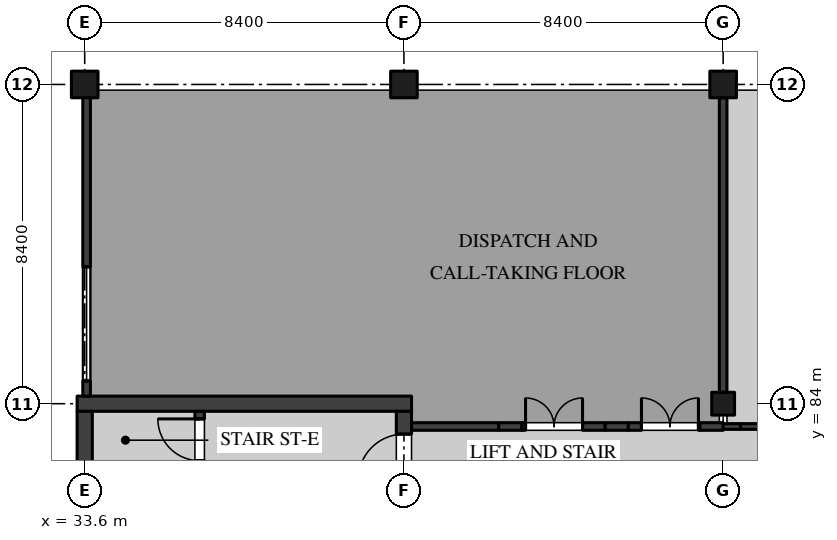
"""IFC4 building model, lengths in metres.
Left out: names, types, materials, properties, quantities, classifications, styles, units other than length and angle.
Written with IfcOpenShell. Run it as: python <this file> out.ifc"""

import sys

from ifc_helpers import new_model, si_unit, direction, frame, frame_2d, origin, origin_2d, place, context, subcontext, project, spatial, rectangle, extrude, element, fill, save


model = new_model("IFC4")
c1 = context("Model", 3, precision=1e-05, world=origin(), true_north=direction((0.0, 1.0)))
c2 = subcontext(c1, "Body", "Model", "MODEL_VIEW")
j1 = project(units=[si_unit("LENGTHUNIT", "METRE"), si_unit("PLANEANGLEUNIT", "RADIAN")], contexts=[c1])
p1 = place(None, origin())
s1 = spatial("IfcSite", under=j1, at=p1, CompositionType="ELEMENT")
p2 = place(p1, origin())
s2 = spatial("IfcBuilding", under=s1, at=p2, CompositionType="ELEMENT")
p3 = place(p2, frame((0.0, 0.0, 5.4)))
s3 = spatial("IfcBuildingStorey", under=s2, at=p3, CompositionType="ELEMENT", Elevation=5.4)
for number, where, z_axis, x_axis in (
    (1, (33.6, 92.4, 0.0), (0.0, 0.0, 1.0), (1.0, 0.0, 0.0)),
    (2, (42.0, 92.4, 0.0), (0.0, 0.0, 1.0), (1.0, 0.0, 0.0)),
):
    element("IfcColumn", number, at=place(p3, frame(where, z_axis=z_axis, x_axis=x_axis)), inside=s3, PredefinedType="COLUMN", context=c2, shape_type="SweptSolid", body=[
        extrude(rectangle(XDim=0.7, YDim=0.7, at=origin_2d()), origin(), (0.0, 0.0, 1.0), 4.37),
    ])
p4 = place(p3, frame((50.4, 84.0, 0.0), z_axis=(0.0, 0.0, 1.0), x_axis=(1.0, 0.0, 0.0)))
e3 = element("IfcColumn", 3, at=p4, inside=s3, PredefinedType="COLUMN", context=c2, shape_type="SweptSolid", body=[
    extrude(rectangle(XDim=0.6, YDim=0.6, at=origin_2d()), origin(), (0.0, 0.0, 1.0), 4.37),
])
p5 = place(p3, frame((50.4, 92.4, 0.0), z_axis=(0.0, 0.0, 1.0), x_axis=(1.0, 0.0, 0.0)))
e4 = element("IfcColumn", 4, at=p5, inside=s3, PredefinedType="COLUMN", context=c2, shape_type="SweptSolid", body=[
    extrude(rectangle(XDim=0.7, YDim=0.7, at=origin_2d()), origin(), (0.0, 0.0, 1.0), 4.37),
])
p6 = place(p3, frame((33.4, 84.0, 0.0), z_axis=(0.0, 0.0, 1.0), x_axis=(1.0, 0.0, 0.0)))
e5 = element("IfcWall", 5, at=p6, inside=s3, PredefinedType="SHEAR", context=c2, shape_type="SweptSolid", body=[
    extrude(rectangle(XDim=8.8, YDim=0.4, at=frame_2d((4.4, 0.0))), origin(), (0.0, 0.0, 1.0), 4.37),
])
p7 = place(p3, frame((33.6, 75.8, 0.0), z_axis=(0.0, 0.0, 1.0), x_axis=(0.0, 1.0, 0.0)))
e6 = element("IfcWall", 6, at=p7, inside=s3, PredefinedType="SHEAR", context=c2, shape_type="SweptSolid", body=[
    extrude(rectangle(XDim=8.0, YDim=0.4, at=frame_2d((4.0, 0.0))), origin(), (0.0, 0.0, 1.0), 4.37),
])
p8 = place(p3, frame((42.0, 75.8, 0.0), z_axis=(0.0, 0.0, 1.0), x_axis=(0.0, 1.0, 0.0)))
e7 = element("IfcWall", 7, at=p8, inside=s3, PredefinedType="SHEAR", context=c2, shape_type="SweptSolid", body=[
    extrude(rectangle(XDim=8.0, YDim=0.4, at=frame_2d((4.0, 0.0))), origin(), (0.0, 0.0, 1.0), 4.37),
])
p9 = place(p8, frame((6.2, 0.0, 0.0)))
e8 = element("IfcOpeningElement", 8, at=p9, cuts=e7, PredefinedType="OPENING", context=c2, shape_type="SweptSolid", body=[
    extrude(rectangle(XDim=1.2, YDim=2.1, at=frame_2d((0.6, 1.05))), frame((0.0, 0.21, 0.0), z_axis=(0.0, -1.0, 0.0), x_axis=(1.0, 0.0, 0.0)), (0.0, 0.0, 1.0), 0.42),
])
p10 = place(p3, frame((36.625, 83.8, 0.0), z_axis=(0.0, 0.0, 1.0), x_axis=(0.0, -1.0, 0.0)))
e9 = element("IfcWall", 9, at=p10, inside=s3, PredefinedType="SOLIDWALL", context=c2, shape_type="SweptSolid", body=[
    extrude(rectangle(XDim=8.0, YDim=0.25, at=frame_2d((4.0, 0.0))), origin(), (0.0, 0.0, 1.0), 4.37),
])
p11 = place(p10, frame((0.2, 0.0, 0.0)))
e10 = element("IfcOpeningElement", 10, at=p11, cuts=e9, PredefinedType="OPENING", context=c2, shape_type="SweptSolid", body=[
    extrude(rectangle(XDim=1.1, YDim=2.1, at=frame_2d((0.55, 1.05))), frame((0.0, 0.135, 0.0), z_axis=(0.0, -1.0, 0.0), x_axis=(1.0, 0.0, 0.0)), (0.0, 0.0, 1.0), 0.27),
])
p12 = place(p3, frame((42.2, 83.4, 0.0), z_axis=(0.0, 0.0, 1.0), x_axis=(1.0, 0.0, 0.0)))
e11 = element("IfcWall", 11, at=p12, inside=s3, PredefinedType="PARTITIONING", context=c2, shape_type="SweptSolid", body=[
    extrude(rectangle(XDim=2.295, YDim=0.2, at=frame_2d((1.147, 0.0))), origin(), (0.0, 0.0, 1.0), 4.37),
])
p13 = place(p3, frame((44.495, 83.4, 0.0), z_axis=(0.0, 0.0, 1.0), x_axis=(1.0, 0.0, 0.0)))
e12 = element("IfcWall", 12, at=p13, inside=s3, PredefinedType="PARTITIONING", context=c2, shape_type="SweptSolid", body=[
    extrude(rectangle(XDim=0.61, YDim=0.2, at=frame_2d((0.305, 0.0))), origin(), (0.0, 0.0, 1.0), 3.895),
])
p14 = place(p3, frame((45.105, 83.4, 0.0), z_axis=(0.0, 0.0, 1.0), x_axis=(1.0, 0.0, 0.0)))
e13 = element("IfcWall", 13, at=p14, inside=s3, PredefinedType="PARTITIONING", context=c2, shape_type="SweptSolid", body=[
    extrude(rectangle(XDim=2.19, YDim=0.2, at=frame_2d((1.095, 0.0))), origin(), (0.0, 0.0, 1.0), 4.37),
])
p15 = place(p14, frame((0.095, 0.0, 0.0)))
e14 = element("IfcOpeningElement", 14, at=p15, cuts=e13, PredefinedType="OPENING", context=c2, shape_type="SweptSolid", body=[
    extrude(rectangle(XDim=1.5, YDim=2.1, at=frame_2d((0.75, 1.05))), frame((0.0, 0.11, 0.0), z_axis=(0.0, -1.0, 0.0), x_axis=(1.0, 0.0, 0.0)), (0.0, 0.0, 1.0), 0.22),
])
p16 = place(p3, frame((47.295, 83.4, 0.0), z_axis=(0.0, 0.0, 1.0), x_axis=(1.0, 0.0, 0.0)))
e15 = element("IfcWall", 15, at=p16, inside=s3, PredefinedType="PARTITIONING", context=c2, shape_type="SweptSolid", body=[
    extrude(rectangle(XDim=0.61, YDim=0.2, at=frame_2d((0.305, 0.0))), origin(), (0.0, 0.0, 1.0), 3.895),
])
p17 = place(p3, frame((47.905, 83.4, 0.0), z_axis=(0.0, 0.0, 1.0), x_axis=(1.0, 0.0, 0.0)))
e16 = element("IfcWall", 16, at=p17, inside=s3, PredefinedType="PARTITIONING", context=c2, shape_type="SweptSolid", body=[
    extrude(rectangle(XDim=1.885, YDim=0.2, at=frame_2d((0.942, 0.0))), origin(), (0.0, 0.0, 1.0), 4.37),
])
p18 = place(p17, frame((0.345, 0.0, 0.0)))
e17 = element("IfcOpeningElement", 17, at=p18, cuts=e16, PredefinedType="OPENING", context=c2, shape_type="SweptSolid", body=[
    extrude(rectangle(XDim=1.5, YDim=2.1, at=frame_2d((0.75, 1.05))), frame((0.0, 0.11, 0.0), z_axis=(0.0, -1.0, 0.0), x_axis=(1.0, 0.0, 0.0)), (0.0, 0.0, 1.0), 0.22),
])
p19 = place(p3, frame((49.79, 83.4, 0.0), z_axis=(0.0, 0.0, 1.0), x_axis=(1.0, 0.0, 0.0)))
e18 = element("IfcWall", 18, at=p19, inside=s3, PredefinedType="PARTITIONING", context=c2, shape_type="SweptSolid", body=[
    extrude(rectangle(XDim=0.61, YDim=0.2, at=frame_2d((0.305, 0.0))), origin(), (0.0, 0.0, 1.0), 3.746),
])
p20 = place(p3, frame((50.4, 83.4, 0.0), z_axis=(0.0, 0.0, 1.0), x_axis=(1.0, 0.0, 0.0)))
e19 = element("IfcWall", 19, at=p20, inside=s3, PredefinedType="PARTITIONING", context=c2, shape_type="SweptSolid", body=[
    extrude(rectangle(XDim=0.46, YDim=0.15, at=frame_2d((0.23, 0.0))), origin(), (0.0, 0.0, 1.0), 3.746),
])
p21 = place(p3, frame((50.86, 83.4, 0.0), z_axis=(0.0, 0.0, 1.0), x_axis=(1.0, 0.0, 0.0)))
e20 = element("IfcWall", 20, at=p21, inside=s3, PredefinedType="PARTITIONING", context=c2, shape_type="SweptSolid", body=[
    extrude(rectangle(XDim=2.11, YDim=0.15, at=frame_2d((1.055, 0.0))), origin(), (0.0, 0.0, 1.0), 4.37),
])
p22 = place(p3, frame((50.4, 84.3, 0.0), z_axis=(0.0, 0.0, 1.0), x_axis=(0.0, 1.0, 0.0)))
e21 = element("IfcWall", 21, at=p22, inside=s3, PredefinedType="PARTITIONING", context=c2, shape_type="SweptSolid", body=[
    extrude(rectangle(XDim=7.75, YDim=0.2, at=frame_2d((3.875, 0.0))), origin(), (0.0, 0.0, 1.0), 3.746),
])
p23 = place(p3, frame((33.65, 92.07, 0.0), z_axis=(0.0, 0.0, 1.0), x_axis=(0.0, -1.0, 0.0)))
e22 = element("IfcWall", 22, at=p23, inside=s3, PredefinedType="SOLIDWALL", context=c2, shape_type="SweptSolid", body=[
    extrude(rectangle(XDim=7.87, YDim=0.2, at=frame_2d((3.935, 0.0))), origin(), (0.0, 0.0, 1.0), 3.746),
])
p24 = place(p23, frame((4.47, 0.0, 0.9)))
e23 = element("IfcOpeningElement", 23, at=p24, cuts=e22, PredefinedType="OPENING", context=c2, shape_type="SweptSolid", body=[
    extrude(rectangle(XDim=3.0, YDim=2.1, at=frame_2d((1.5, 1.05))), frame((0.0, 0.11, 0.0), z_axis=(0.0, -1.0, 0.0), x_axis=(1.0, 0.0, 0.0)), (0.0, 0.0, 1.0), 0.22),
])
p25 = place(p9, origin())
e24 = element("IfcDoor", 24, at=p25, inside=s3, OperationType="SINGLE_SWING_RIGHT", PredefinedType="DOOR", context=c2, shape_type="SweptSolid", body=[
    extrude(rectangle(XDim=1.2, YDim=2.1, at=frame_2d((0.6, 1.05))), frame((0.0, 0.035, 0.0), z_axis=(0.0, -1.0, 0.0), x_axis=(1.0, 0.0, 0.0)), (0.0, 0.0, 1.0), 0.07),
])
fill(e8, e24)
p26 = place(p11, frame((1.1, 0.0, 0.0), z_axis=(0.0, 0.0, 1.0), x_axis=(-1.0, 0.0, 0.0)))
e25 = element("IfcDoor", 25, at=p26, inside=s3, OperationType="SINGLE_SWING_LEFT", PredefinedType="DOOR", context=c2, shape_type="SweptSolid", body=[
    extrude(rectangle(XDim=1.1, YDim=2.1, at=frame_2d((0.55, 1.05))), frame((0.0, 0.035, 0.0), z_axis=(0.0, -1.0, 0.0), x_axis=(1.0, 0.0, 0.0)), (0.0, 0.0, 1.0), 0.07),
])
fill(e10, e25)
p27 = place(p15, origin())
e26 = element("IfcDoor", 26, at=p27, inside=s3, OperationType="DOUBLE_DOOR_SINGLE_SWING", PredefinedType="DOOR", context=c2, shape_type="SweptSolid", body=[
    extrude(rectangle(XDim=1.5, YDim=2.1, at=frame_2d((0.75, 1.05))), frame((0.0, 0.03, 0.0), z_axis=(0.0, -1.0, 0.0), x_axis=(1.0, 0.0, 0.0)), (0.0, 0.0, 1.0), 0.06),
])
fill(e14, e26)
p28 = place(p18, origin())
e27 = element("IfcDoor", 27, at=p28, inside=s3, OperationType="DOUBLE_DOOR_SINGLE_SWING", PredefinedType="DOOR", context=c2, shape_type="SweptSolid", body=[
    extrude(rectangle(XDim=1.5, YDim=2.1, at=frame_2d((0.75, 1.05))), frame((0.0, 0.03, 0.0), z_axis=(0.0, -1.0, 0.0), x_axis=(1.0, 0.0, 0.0)), (0.0, 0.0, 1.0), 0.06),
])
fill(e17, e27)
p29 = place(p24, origin())
e28 = element("IfcWindow", 28, at=p29, inside=s3, PartitioningType="SINGLE_PANEL", PredefinedType="WINDOW", context=c2, shape_type="SweptSolid", body=[
    extrude(rectangle(XDim=3.0, YDim=2.1, at=frame_2d((1.5, 1.05))), frame((0.0, 0.04, 0.0), z_axis=(0.0, -1.0, 0.0), x_axis=(1.0, 0.0, 0.0)), (0.0, 0.0, 1.0), 0.08),
])
fill(e23, e28)
save(model, sys.argv[1])
